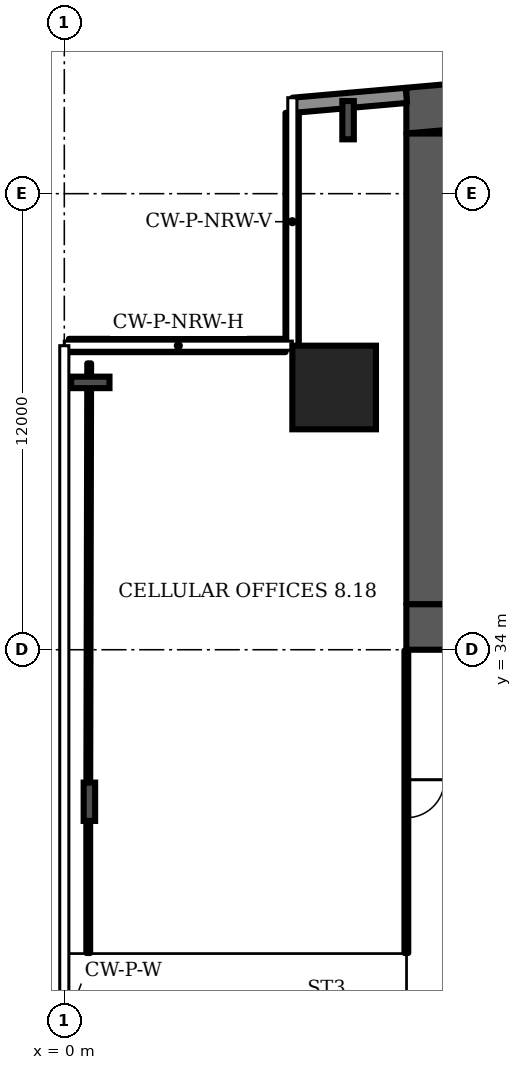
"""IFC4 building model, lengths in metres.
Left out: names, types, materials, properties, quantities, classifications, styles, units other than length and angle.
Written with IfcOpenShell. Run it as: python <this file> out.ifc"""

import sys

from ifc_helpers import new_model, si_unit, direction, frame, frame_2d, origin, origin_2d, place, context, subcontext, project, spatial, polyline, rectangle, i_section, outline, extrude, element, fill, save


model = new_model("IFC4")
c1 = context("Model", 3, precision=1e-05, world=origin(), true_north=direction((0.0, 1.0)))
c2 = subcontext(c1, "Body", "Model", "MODEL_VIEW")
j1 = project(units=[si_unit("LENGTHUNIT", "METRE"), si_unit("PLANEANGLEUNIT", "RADIAN")], contexts=[c1])
p1 = place(None, origin())
s1 = spatial("IfcSite", under=j1, at=p1, CompositionType="ELEMENT")
p2 = place(p1, origin())
s2 = spatial("IfcBuilding", under=s1, at=p2, CompositionType="ELEMENT")
p3 = place(p2, frame((0.0, 0.0, 48.7)))
s3 = spatial("IfcBuildingStorey", under=s2, at=p3, CompositionType="ELEMENT", Elevation=48.7)
p4 = place(p3, origin())
e1 = element("IfcWall", 1, at=p4, inside=s3, PredefinedType="SHEAR", context=c2, shape_type="SweptSolid", body=[
    extrude(outline(polyline([(9.0, 47.583), (37.0, 50.032), (65.0, 47.583), (65.0, 48.787), (37.0, 51.237), (9.0, 48.787), (9.0, 47.583)])), origin(), (0.0, 0.0, 1.0), 3.6),
])
p5 = place(p3, frame((9.0, 34.6, 0.0), z_axis=(0.0, 0.0, 1.0), x_axis=(1.0, 0.0, 0.0)))
e2 = element("IfcWall", 2, at=p5, inside=s3, PredefinedType="SHEAR", context=c2, shape_type="SweptSolid", body=[
    extrude(rectangle(XDim=56.0, YDim=1.2, at=frame_2d((28.0, 0.0))), origin(), (0.0, 0.0, 1.0), 3.6),
])
p6 = place(p5, frame((3.3, 0.0, 0.0)))
e3 = element("IfcOpeningElement", 3, at=p6, cuts=e2, PredefinedType="OPENING", context=c2, shape_type="SweptSolid", body=[
    extrude(rectangle(XDim=1.0, YDim=2.1, at=frame_2d((0.5, 1.05))), frame((0.0, 0.61, 0.0), z_axis=(0.0, -1.0, 0.0), x_axis=(1.0, 0.0, 0.0)), (0.0, 0.0, 1.0), 1.22),
])
p7 = place(p5, frame((7.867, 0.0, 0.0)))
e4 = element("IfcOpeningElement", 4, at=p7, cuts=e2, PredefinedType="OPENING", context=c2, shape_type="SweptSolid", body=[
    extrude(rectangle(XDim=1.1, YDim=2.1, at=frame_2d((0.55, 1.05))), frame((0.0, 0.61, 0.0), z_axis=(0.0, -1.0, 0.0), x_axis=(1.0, 0.0, 0.0)), (0.0, 0.0, 1.0), 1.22),
])
p8 = place(p5, frame((12.033, 0.0, 0.0)))
e5 = element("IfcOpeningElement", 5, at=p8, cuts=e2, PredefinedType="OPENING", context=c2, shape_type="SweptSolid", body=[
    extrude(rectangle(XDim=1.1, YDim=2.1, at=frame_2d((0.55, 1.05))), frame((0.0, 0.61, 0.0), z_axis=(0.0, -1.0, 0.0), x_axis=(1.0, 0.0, 0.0)), (0.0, 0.0, 1.0), 1.22),
])
p9 = place(p5, frame((9.8, 0.0, 0.0)))
e6 = element("IfcOpeningElement", 6, at=p9, cuts=e2, PredefinedType="OPENING", context=c2, shape_type="SweptSolid", body=[
    extrude(rectangle(XDim=1.4, YDim=2.1, at=frame_2d((0.7, 1.05))), frame((0.0, 0.61, 0.0), z_axis=(0.0, -1.0, 0.0), x_axis=(1.0, 0.0, 0.0)), (0.0, 0.0, 1.0), 1.22),
])
p10 = place(p5, frame((14.65, 0.0, 0.0)))
e7 = element("IfcOpeningElement", 7, at=p10, cuts=e2, PredefinedType="OPENING", context=c2, shape_type="SweptSolid", body=[
    extrude(rectangle(XDim=1.2, YDim=2.1, at=frame_2d((0.6, 1.05))), frame((0.0, 0.61, 0.0), z_axis=(0.0, -1.0, 0.0), x_axis=(1.0, 0.0, 0.0)), (0.0, 0.0, 1.0), 1.22),
])
p11 = place(p5, frame((21.867, 0.0, 0.0)))
e8 = element("IfcOpeningElement", 8, at=p11, cuts=e2, PredefinedType="OPENING", context=c2, shape_type="SweptSolid", body=[
    extrude(rectangle(XDim=1.1, YDim=2.1, at=frame_2d((0.55, 1.05))), frame((0.0, 0.61, 0.0), z_axis=(0.0, -1.0, 0.0), x_axis=(1.0, 0.0, 0.0)), (0.0, 0.0, 1.0), 1.22),
])
p12 = place(p5, frame((26.033, 0.0, 0.0)))
e9 = element("IfcOpeningElement", 9, at=p12, cuts=e2, PredefinedType="OPENING", context=c2, shape_type="SweptSolid", body=[
    extrude(rectangle(XDim=1.1, YDim=2.1, at=frame_2d((0.55, 1.05))), frame((0.0, 0.61, 0.0), z_axis=(0.0, -1.0, 0.0), x_axis=(1.0, 0.0, 0.0)), (0.0, 0.0, 1.0), 1.22),
])
p13 = place(p5, frame((23.8, 0.0, 0.0)))
e10 = element("IfcOpeningElement", 10, at=p13, cuts=e2, PredefinedType="OPENING", context=c2, shape_type="SweptSolid", body=[
    extrude(rectangle(XDim=1.4, YDim=2.1, at=frame_2d((0.7, 1.05))), frame((0.0, 0.61, 0.0), z_axis=(0.0, -1.0, 0.0), x_axis=(1.0, 0.0, 0.0)), (0.0, 0.0, 1.0), 1.22),
])
p14 = place(p5, frame((28.867, 0.0, 0.0)))
e11 = element("IfcOpeningElement", 11, at=p14, cuts=e2, PredefinedType="OPENING", context=c2, shape_type="SweptSolid", body=[
    extrude(rectangle(XDim=1.1, YDim=2.1, at=frame_2d((0.55, 1.05))), frame((0.0, 0.61, 0.0), z_axis=(0.0, -1.0, 0.0), x_axis=(1.0, 0.0, 0.0)), (0.0, 0.0, 1.0), 1.22),
])
p15 = place(p5, frame((33.033, 0.0, 0.0)))
e12 = element("IfcOpeningElement", 12, at=p15, cuts=e2, PredefinedType="OPENING", context=c2, shape_type="SweptSolid", body=[
    extrude(rectangle(XDim=1.1, YDim=2.1, at=frame_2d((0.55, 1.05))), frame((0.0, 0.61, 0.0), z_axis=(0.0, -1.0, 0.0), x_axis=(1.0, 0.0, 0.0)), (0.0, 0.0, 1.0), 1.22),
])
p16 = place(p5, frame((40.15, 0.0, 0.0)))
e13 = element("IfcOpeningElement", 13, at=p16, cuts=e2, PredefinedType="OPENING", context=c2, shape_type="SweptSolid", body=[
    extrude(rectangle(XDim=1.2, YDim=2.1, at=frame_2d((0.6, 1.05))), frame((0.0, 0.61, 0.0), z_axis=(0.0, -1.0, 0.0), x_axis=(1.0, 0.0, 0.0)), (0.0, 0.0, 1.0), 1.22),
])
p17 = place(p5, frame((44.8, 0.0, 0.0)))
e14 = element("IfcOpeningElement", 14, at=p17, cuts=e2, PredefinedType="OPENING", context=c2, shape_type="SweptSolid", body=[
    extrude(rectangle(XDim=1.4, YDim=2.1, at=frame_2d((0.7, 1.05))), frame((0.0, 0.61, 0.0), z_axis=(0.0, -1.0, 0.0), x_axis=(1.0, 0.0, 0.0)), (0.0, 0.0, 1.0), 1.22),
])
p18 = place(p5, frame((49.867, 0.0, 0.0)))
e15 = element("IfcOpeningElement", 15, at=p18, cuts=e2, PredefinedType="OPENING", context=c2, shape_type="SweptSolid", body=[
    extrude(rectangle(XDim=1.1, YDim=2.1, at=frame_2d((0.55, 1.05))), frame((0.0, 0.61, 0.0), z_axis=(0.0, -1.0, 0.0), x_axis=(1.0, 0.0, 0.0)), (0.0, 0.0, 1.0), 1.22),
])
p19 = place(p5, frame((53.5, 0.0, 0.0)))
e16 = element("IfcOpeningElement", 16, at=p19, cuts=e2, PredefinedType="OPENING", context=c2, shape_type="SweptSolid", body=[
    extrude(rectangle(XDim=1.1, YDim=2.1, at=frame_2d((0.55, 1.05))), frame((0.0, 0.61, 0.0), z_axis=(0.0, -1.0, 0.0), x_axis=(1.0, 0.0, 0.0)), (0.0, 0.0, 1.0), 1.22),
])
p20 = place(p5, frame((51.567, 0.0, 0.0)))
e17 = element("IfcOpeningElement", 17, at=p20, cuts=e2, PredefinedType="OPENING", context=c2, shape_type="SweptSolid", body=[
    extrude(rectangle(XDim=1.4, YDim=2.1, at=frame_2d((0.7, 1.05))), frame((0.0, 0.61, 0.0), z_axis=(0.0, -1.0, 0.0), x_axis=(1.0, 0.0, 0.0)), (0.0, 0.0, 1.0), 1.22),
])
p21 = place(p3, frame((9.6, 35.2, 0.0), z_axis=(0.0, 0.0, 1.0), x_axis=(0.0, 1.0, 0.0)))
e18 = element("IfcWall", 18, at=p21, inside=s3, PredefinedType="SHEAR", context=c2, shape_type="SweptSolid", body=[
    extrude(rectangle(XDim=12.383, YDim=1.2, at=frame_2d((6.191, 0.0))), origin(), (0.0, 0.0, 1.0), 3.6),
])
p22 = place(p3, frame((7.1, 40.9, 0.0), z_axis=(0.0, 0.0, 1.0), x_axis=(1.0, 0.0, 0.0)))
e19 = element("IfcColumn", 19, at=p22, inside=s3, PredefinedType="COLUMN", context=c2, shape_type="SweptSolid", body=[
    extrude(rectangle(XDim=2.2, YDim=2.2, at=origin_2d()), origin(), (0.0, 0.0, 1.0), 3.6),
])
for number, where, z_axis, x_axis in (
    (20, (7.467, 47.934, 0.0), (0.0, 0.0, 1.0), (-1.0, 0.0, 0.0)),
    (21, (0.685, 41.034, 0.0), (0.0, 0.0, 1.0), (0.0, 1.0, 0.0)),
    (22, (0.66, 30.0, 0.0), (0.0, 0.0, 1.0), (-1.0, 0.0, 0.0)),
):
    element("IfcColumn", number, at=place(p3, frame(where, z_axis=z_axis, x_axis=x_axis)), inside=s3, PredefinedType="COLUMN", context=c2, shape_type="SweptSolid", body=[
        extrude(i_section(OverallWidth=0.302, OverallDepth=1.008, WebThickness=0.021, FlangeThickness=0.04, FilletRadius=0.03, at=origin_2d()), origin(), (0.0, 0.0, 1.0), 3.6),
    ])
p23 = place(p3, frame((9.0, 48.587, 0.0), z_axis=(0.0, 0.0, 1.0), x_axis=(-0.996194, -0.087168, 0.0)))
e23 = element("IfcWall", 23, at=p23, inside=s3, PredefinedType="SOLIDWALL", context=c2, shape_type="SweptSolid", body=[
    extrude(rectangle(XDim=2.994, YDim=0.4, at=frame_2d((1.497, 0.0))), origin(), (0.0, 0.0, 1.0), 3.2),
])
p24 = place(p3, frame((5.995, 48.126, 0.0), z_axis=(0.0, 0.0, 1.0), x_axis=(0.0, -1.0, 0.0)))
e24 = element("IfcWall", 24, at=p24, inside=s3, PredefinedType="SOLIDWALL", context=c2, shape_type="SweptSolid", body=[
    extrude(rectangle(XDim=6.126, YDim=0.35, at=frame_2d((3.063, 0.0))), origin(), (0.0, 0.0, 1.0), 1.0),
])
p25 = place(p3, frame((5.82, 42.005, 0.0), z_axis=(0.0, 0.0, 1.0), x_axis=(-1.0, 0.0, 0.0)))
e25 = element("IfcWall", 25, at=p25, inside=s3, PredefinedType="SOLIDWALL", context=c2, shape_type="SweptSolid", body=[
    extrude(rectangle(XDim=5.7, YDim=0.35, at=frame_2d((2.85, 0.0))), origin(), (0.0, 0.0, 1.0), 1.0),
])
p26 = place(p3, frame((0.63, 26.02, 0.0), z_axis=(0.0, 0.0, 1.0), x_axis=(0.0, 1.0, 0.0)))
e26 = element("IfcWall", 26, at=p26, inside=s3, PredefinedType="PARTITIONING", context=c2, shape_type="SweptSolid", body=[
    extrude(rectangle(XDim=3.98, YDim=0.1, at=frame_2d((1.99, 0.0))), origin(), (0.0, 0.0, 1.0), 2.58),
])
p27 = place(p3, frame((0.63, 30.0, 0.0), z_axis=(0.0, 0.0, 1.0), x_axis=(0.00218, 0.999994, 0.0)))
e27 = element("IfcWall", 27, at=p27, inside=s3, PredefinedType="PARTITIONING", context=c2, shape_type="SweptSolid", body=[
    extrude(rectangle(XDim=11.535, YDim=0.1, at=frame_2d((5.768, 0.0))), origin(), (0.0, 0.0, 1.0), 2.58),
])
p28 = place(p3, frame((9.0, 26.02, 0.0), z_axis=(0.0, 0.0, 1.0), x_axis=(0.0, 1.0, 0.0)))
e28 = element("IfcWall", 28, at=p28, inside=s3, PredefinedType="PARTITIONING", context=c2, shape_type="SweptSolid", body=[
    extrude(rectangle(XDim=7.96, YDim=0.1, at=frame_2d((3.98, 0.0))), origin(), (0.0, 0.0, 1.0), 3.2),
])
p29 = place(p28, frame((3.56, 0.0, 0.0)))
e29 = element("IfcOpeningElement", 29, at=p29, cuts=e28, PredefinedType="OPENING", context=c2, shape_type="SweptSolid", body=[
    extrude(rectangle(XDim=1.0, YDim=2.1, at=frame_2d((0.5, 1.05))), frame((0.0, 0.06, 0.0), z_axis=(0.0, -1.0, 0.0), x_axis=(1.0, 0.0, 0.0)), (0.0, 0.0, 1.0), 0.12),
])
p30 = place(p29, origin())
e30 = element("IfcDoor", 30, at=p30, inside=s3, OperationType="SINGLE_SWING_RIGHT", PredefinedType="DOOR", context=c2, shape_type="SweptSolid", body=[
    extrude(rectangle(XDim=1.0, YDim=2.1, at=frame_2d((0.5, 1.05))), frame((0.0, 0.025, 0.0), z_axis=(0.0, -1.0, 0.0), x_axis=(1.0, 0.0, 0.0)), (0.0, 0.0, 1.0), 0.05),
])
fill(e29, e30)
save(model, sys.argv[1])
